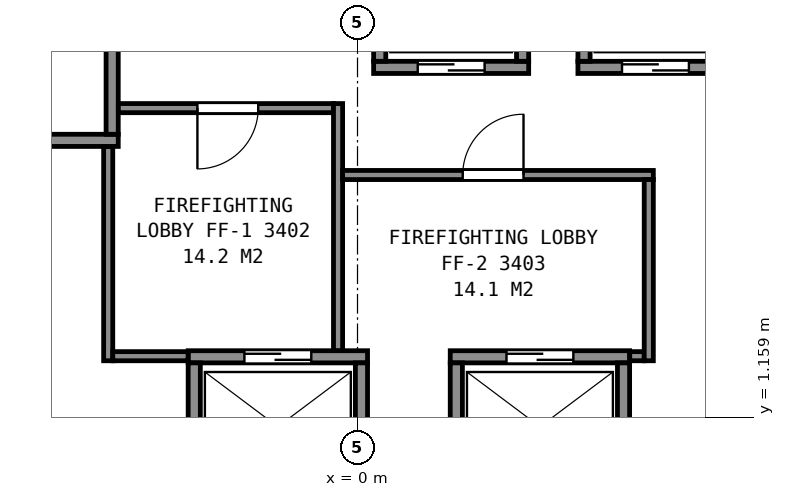
"""IFC4 building model, lengths in metres.
Left out: names, types, materials, properties, quantities, classifications, styles, units other than length and angle.
Written with IfcOpenShell. Run it as: python <this file> out.ifc"""

import sys

from ifc_helpers import new_model, si_unit, direction, frame, frame_2d, origin, place, context, subcontext, project, spatial, rectangle, extrude, element, fill, save


model = new_model("IFC4")
c1 = context("Model", 3, precision=1e-05, world=origin(), true_north=direction((0.0, 1.0)))
c2 = subcontext(c1, "Body", "Model", "MODEL_VIEW")
j1 = project(units=[si_unit("LENGTHUNIT", "METRE"), si_unit("PLANEANGLEUNIT", "RADIAN")], contexts=[c1])
p1 = place(None, origin())
s1 = spatial("IfcSite", under=j1, at=p1, CompositionType="ELEMENT")
p2 = place(p1, origin())
s2 = spatial("IfcBuilding", under=s1, at=p2, CompositionType="ELEMENT")
p3 = place(p2, frame((0.0, 0.0, 139.6)))
s3 = spatial("IfcBuildingStorey", under=s2, at=p3, CompositionType="ELEMENT", Elevation=139.6)
p4 = place(p3, frame((-2.785, 2.15, 0.0), z_axis=(0.0, 0.0, 1.0), x_axis=(1.0, 0.0, 0.0)))
e1 = element("IfcWall", 1, at=p4, inside=s3, PredefinedType="PARTITIONING", context=c2, shape_type="SweptSolid", body=[
    extrude(rectangle(XDim=2.95, YDim=0.2, at=frame_2d((1.475, 0.0))), origin(), (0.0, 0.0, 1.0), 3.6),
])
p5 = place(p4, frame((0.925, 0.0, 0.0)))
e2 = element("IfcOpeningElement", 2, at=p5, cuts=e1, PredefinedType="OPENING", context=c2, shape_type="SweptSolid", body=[
    extrude(rectangle(XDim=1.1, YDim=2.1, at=frame_2d((0.55, 1.05))), frame((0.0, 0.11, 0.0), z_axis=(0.0, -1.0, 0.0), x_axis=(1.0, 0.0, 0.0)), (0.0, 0.0, 1.0), 0.22),
])
p6 = place(p3, frame((1.525, 2.15, 0.0), z_axis=(0.0, 0.0, 1.0), x_axis=(1.0, 0.0, 0.0)))
e3 = element("IfcWall", 3, at=p6, inside=s3, PredefinedType="PARTITIONING", context=c2, shape_type="SweptSolid", body=[
    extrude(rectangle(XDim=2.95, YDim=0.2, at=frame_2d((1.475, 0.0))), origin(), (0.0, 0.0, 1.0), 3.6),
])
p7 = place(p6, frame((0.925, 0.0, 0.0)))
e4 = element("IfcOpeningElement", 4, at=p7, cuts=e3, PredefinedType="OPENING", context=c2, shape_type="SweptSolid", body=[
    extrude(rectangle(XDim=1.1, YDim=2.1, at=frame_2d((0.55, 1.05))), frame((0.0, 0.11, 0.0), z_axis=(0.0, -1.0, 0.0), x_axis=(1.0, 0.0, 0.0)), (0.0, 0.0, 1.0), 0.22),
])
p8 = place(p3, frame((-6.285, 5.71, 0.0), z_axis=(0.0, 0.0, 1.0), x_axis=(1.0, 0.0, 0.0)))
e5 = element("IfcWall", 5, at=p8, inside=s3, PredefinedType="PARTITIONING", context=c2, shape_type="SweptSolid", body=[
    extrude(rectangle(XDim=2.35, YDim=0.2, at=frame_2d((1.175, 0.0))), origin(), (0.0, 0.0, 1.0), 3.6),
])
p9 = place(p3, frame((0.265, 6.91, 0.0), z_axis=(0.0, 0.0, 1.0), x_axis=(1.0, 0.0, 0.0)))
e6 = element("IfcWall", 6, at=p9, inside=s3, PredefinedType="PARTITIONING", context=c2, shape_type="SweptSolid", body=[
    extrude(rectangle(XDim=2.55, YDim=0.2, at=frame_2d((1.275, 0.0))), origin(), (0.0, 0.0, 1.0), 3.6),
])
p10 = place(p9, frame((0.725, 0.0, 0.0)))
e7 = element("IfcOpeningElement", 7, at=p10, cuts=e6, PredefinedType="OPENING", context=c2, shape_type="SweptSolid", body=[
    extrude(rectangle(XDim=1.1, YDim=2.1, at=frame_2d((0.55, 1.05))), frame((0.0, 0.11, 0.0), z_axis=(0.0, -1.0, 0.0), x_axis=(1.0, 0.0, 0.0)), (0.0, 0.0, 1.0), 0.22),
])
p11 = place(p3, frame((3.625, 6.91, 0.0), z_axis=(0.0, 0.0, 1.0), x_axis=(1.0, 0.0, 0.0)))
e8 = element("IfcWall", 8, at=p11, inside=s3, PredefinedType="PARTITIONING", context=c2, shape_type="SweptSolid", body=[
    extrude(rectangle(XDim=2.55, YDim=0.2, at=frame_2d((1.275, 0.0))), origin(), (0.0, 0.0, 1.0), 3.6),
])
p12 = place(p11, frame((0.725, 0.0, 0.0)))
e9 = element("IfcOpeningElement", 9, at=p12, cuts=e8, PredefinedType="OPENING", context=c2, shape_type="SweptSolid", body=[
    extrude(rectangle(XDim=1.1, YDim=2.1, at=frame_2d((0.55, 1.05))), frame((0.0, 0.11, 0.0), z_axis=(0.0, -1.0, 0.0), x_axis=(1.0, 0.0, 0.0)), (0.0, 0.0, 1.0), 0.22),
])
p13 = place(p3, frame((5.663, -1.612, 0.0), z_axis=(0.0, 0.0, 1.0), x_axis=(0.49998122708, 0.866036242063, 0.0)))
e10 = element("IfcWall", 10, at=p13, inside=s3, PredefinedType="PARTITIONING", context=c2, shape_type="SweptSolid", body=[
    extrude(rectangle(XDim=4.9, YDim=0.2, at=frame_2d((2.45, 0.0))), origin(), (0.0, 0.0, 1.0), 3.6),
])
p14 = place(p3, frame((4.375, 0.1, 0.0), z_axis=(0.0, 0.0, 1.0), x_axis=(0.0, 1.0, 0.0)))
e11 = element("IfcWall", 11, at=p14, inside=s3, PredefinedType="PARTITIONING", context=c2, shape_type="SweptSolid", body=[
    extrude(rectangle(XDim=1.95, YDim=0.2, at=frame_2d((0.975, 0.0))), origin(), (0.0, 0.0, 1.0), 3.6),
])
for number, where, z_axis, x_axis in (
    (12, (3.725, 7.01, 0.0), (0.0, 0.0, 1.0), (0.0, 1.0, 0.0)),
    (13, (2.715, 7.01, 0.0), (0.0, 0.0, 1.0), (0.0, 1.0, 0.0)),
):
    element("IfcWall", number, at=place(p3, frame(where, z_axis=z_axis, x_axis=x_axis)), inside=s3, PredefinedType="PARTITIONING", context=c2, shape_type="SweptSolid", body=[
        extrude(rectangle(XDim=1.75, YDim=0.2, at=frame_2d((0.875, 0.0))), origin(), (0.0, 0.0, 1.0), 3.6),
    ])
p15 = place(p3, frame((1.625, 0.1, 0.0), z_axis=(0.0, 0.0, 1.0), x_axis=(0.0, 1.0, 0.0)))
e14 = element("IfcWall", 14, at=p15, inside=s3, PredefinedType="PARTITIONING", context=c2, shape_type="SweptSolid", body=[
    extrude(rectangle(XDim=1.95, YDim=0.2, at=frame_2d((0.975, 0.0))), origin(), (0.0, 0.0, 1.0), 3.6),
])
p16 = place(p3, frame((0.365, 7.01, 0.0), z_axis=(0.0, 0.0, 1.0), x_axis=(0.0, 1.0, 0.0)))
e15 = element("IfcWall", 15, at=p16, inside=s3, PredefinedType="PARTITIONING", context=c2, shape_type="SweptSolid", body=[
    extrude(rectangle(XDim=1.75, YDim=0.2, at=frame_2d((0.875, 0.0))), origin(), (0.0, 0.0, 1.0), 3.6),
])
for number, where, z_axis, x_axis in (
    (16, (0.065, 0.1, 0.0), (0.0, 0.0, 1.0), (0.0, 1.0, 0.0)),
    (17, (-2.685, 0.1, 0.0), (0.0, 0.0, 1.0), (0.0, 1.0, 0.0)),
):
    element("IfcWall", number, at=place(p3, frame(where, z_axis=z_axis, x_axis=x_axis)), inside=s3, PredefinedType="PARTITIONING", context=c2, shape_type="SweptSolid", body=[
        extrude(rectangle(XDim=1.95, YDim=0.2, at=frame_2d((0.975, 0.0))), origin(), (0.0, 0.0, 1.0), 3.6),
    ])
p17 = place(p3, frame((-4.035, 5.81, 0.0), z_axis=(0.0, 0.0, 1.0), x_axis=(0.0, 1.0, 0.0)))
e18 = element("IfcWall", 18, at=p17, inside=s3, PredefinedType="PARTITIONING", context=c2, shape_type="SweptSolid", body=[
    extrude(rectangle(XDim=1.75, YDim=0.2, at=frame_2d((0.875, 0.0))), origin(), (0.0, 0.0, 1.0), 3.6),
])
p18 = place(p3, frame((-13.664, 5.946, 0.0), z_axis=(0.0, 0.0, 1.0), x_axis=(0.499994327219, -0.866028678941, 0.0)))
e19 = element("IfcWall", 19, at=p18, inside=s3, PredefinedType="PARTITIONING", context=c2, shape_type="SweptSolid", body=[
    extrude(rectangle(XDim=23.968, YDim=0.2, at=frame_2d((11.984, 0.0))), origin(), (0.0, 0.0, 1.0), 3.35),
])
p19 = place(p3, frame((-4.1, 2.085, 0.0), z_axis=(0.0, 0.0, 1.0), x_axis=(0.0, 1.0, 0.0)))
e20 = element("IfcWall", 20, at=p19, inside=s3, PredefinedType="PARTITIONING", context=c2, shape_type="SweptSolid", body=[
    extrude(rectangle(XDim=3.523, YDim=0.15, at=frame_2d((1.761, 0.0))), origin(), (0.0, 0.0, 1.0), 3.35),
])
p20 = place(p3, frame((-4.025, 2.16, 0.0), z_axis=(0.0, 0.0, 1.0), x_axis=(1.0, 0.0, 0.0)))
e21 = element("IfcWall", 21, at=p20, inside=s3, PredefinedType="PARTITIONING", context=c2, shape_type="SweptSolid", body=[
    extrude(rectangle(XDim=1.238, YDim=0.15, at=frame_2d((0.619, 0.0))), origin(), (0.0, 0.0, 1.0), 3.35),
])
p21 = place(p3, frame((-3.933, 6.24, 0.0), z_axis=(0.0, 0.0, 1.0), x_axis=(1.0, 0.0, 0.0)))
e22 = element("IfcWall", 22, at=p21, inside=s3, PredefinedType="PARTITIONING", context=c2, shape_type="SweptSolid", body=[
    extrude(rectangle(XDim=3.538, YDim=0.15, at=frame_2d((1.769, 0.0))), origin(), (0.0, 0.0, 1.0), 3.35),
])
p22 = place(p21, frame((1.3, 0.0, 0.0)))
e23 = element("IfcOpeningElement", 23, at=p22, cuts=e22, PredefinedType="OPENING", context=c2, shape_type="SweptSolid", body=[
    extrude(rectangle(XDim=1.0, YDim=2.1, at=frame_2d((0.5, 1.05))), frame((0.0, 0.085, 0.0), z_axis=(0.0, -1.0, 0.0), x_axis=(1.0, 0.0, 0.0)), (0.0, 0.0, 1.0), 0.17),
])
p23 = place(p3, frame((-0.32, 2.252, 0.0), z_axis=(0.0, 0.0, 1.0), x_axis=(0.0, 1.0, 0.0)))
e24 = element("IfcWall", 24, at=p23, inside=s3, PredefinedType="PARTITIONING", context=c2, shape_type="SweptSolid", body=[
    extrude(rectangle(XDim=4.063, YDim=0.15, at=frame_2d((2.031, 0.0))), origin(), (0.0, 0.0, 1.0), 3.35),
])
p24 = place(p3, frame((-0.245, 5.14, 0.0), z_axis=(0.0, 0.0, 1.0), x_axis=(1.0, 0.0, 0.0)))
e25 = element("IfcWall", 25, at=p24, inside=s3, PredefinedType="PARTITIONING", context=c2, shape_type="SweptSolid", body=[
    extrude(rectangle(XDim=5.11, YDim=0.15, at=frame_2d((2.555, 0.0))), origin(), (0.0, 0.0, 1.0), 3.35),
])
p25 = place(p24, frame((1.975, 0.0, 0.0)))
e26 = element("IfcOpeningElement", 26, at=p25, cuts=e25, PredefinedType="OPENING", context=c2, shape_type="SweptSolid", body=[
    extrude(rectangle(XDim=1.0, YDim=2.1, at=frame_2d((0.5, 1.05))), frame((0.0, 0.085, 0.0), z_axis=(0.0, -1.0, 0.0), x_axis=(1.0, 0.0, 0.0)), (0.0, 0.0, 1.0), 0.17),
])
p26 = place(p3, frame((4.477, 2.16, 0.0), z_axis=(0.0, 0.0, 1.0), x_axis=(1.0, 0.0, 0.0)))
e27 = element("IfcWall", 27, at=p26, inside=s3, PredefinedType="PARTITIONING", context=c2, shape_type="SweptSolid", body=[
    extrude(rectangle(XDim=0.238, YDim=0.15, at=frame_2d((0.119, 0.0))), origin(), (0.0, 0.0, 1.0), 3.35),
])
p27 = place(p3, frame((4.79, 2.085, 0.0), z_axis=(0.0, 0.0, 1.0), x_axis=(0.0, 1.0, 0.0)))
e28 = element("IfcWall", 28, at=p27, inside=s3, PredefinedType="PARTITIONING", context=c2, shape_type="SweptSolid", body=[
    extrude(rectangle(XDim=2.98, YDim=0.15, at=frame_2d((1.49, 0.0))), origin(), (0.0, 0.0, 1.0), 3.35),
])
p28 = place(p3, frame((-3.756, -15.816, 0.0), z_axis=(0.0, 0.0, 1.0), x_axis=(-0.499992829944, 0.866029543379, 0.0)))
e29 = element("IfcWall", 29, at=p28, inside=s3, PredefinedType="PARTITIONING", context=c2, shape_type="SweptSolid", body=[
    extrude(rectangle(XDim=24.413, YDim=0.125, at=frame_2d((12.207, 0.0))), origin(), (0.0, 0.0, 1.0), 2.262),
])
p29 = place(p28, frame((20.478, 0.0, 0.0)))
e30 = element("IfcOpeningElement", 30, at=p29, cuts=e29, PredefinedType="OPENING", context=c2, shape_type="SweptSolid", body=[
    extrude(rectangle(XDim=1.0, YDim=2.1, at=frame_2d((0.5, 1.05))), frame((0.0, 0.073, 0.0), z_axis=(0.0, -1.0, 0.0), x_axis=(1.0, 0.0, 0.0)), (0.0, 0.0, 1.0), 0.145),
])
p30 = place(p28, frame((5.99, 0.0, 0.0)))
e31 = element("IfcOpeningElement", 31, at=p30, cuts=e29, PredefinedType="OPENING", context=c2, shape_type="SweptSolid", body=[
    extrude(rectangle(XDim=1.0, YDim=2.1, at=frame_2d((0.5, 1.05))), frame((0.0, 0.073, 0.0), z_axis=(0.0, -1.0, 0.0), x_axis=(1.0, 0.0, 0.0)), (0.0, 0.0, 1.0), 0.145),
])
p31 = place(p28, frame((1.561, 0.0, 0.0)))
e32 = element("IfcOpeningElement", 32, at=p31, cuts=e29, PredefinedType="OPENING", context=c2, shape_type="SweptSolid", body=[
    extrude(rectangle(XDim=1.0, YDim=2.1, at=frame_2d((0.5, 1.05))), frame((0.0, 0.073, 0.0), z_axis=(0.0, -1.0, 0.0), x_axis=(1.0, 0.0, 0.0)), (0.0, 0.0, 1.0), 0.145),
])
p32 = place(p3, frame((15.962, 5.326, 0.0), z_axis=(0.0, 0.0, 1.0), x_axis=(-0.499992829944, -0.866029543379, 0.0)))
e33 = element("IfcWall", 33, at=p32, inside=s3, PredefinedType="PARTITIONING", context=c2, shape_type="SweptSolid", body=[
    extrude(rectangle(XDim=24.413, YDim=0.125, at=frame_2d((12.207, 0.0))), origin(), (0.0, 0.0, 1.0), 2.262),
])
p33 = place(p32, frame((21.258, 0.0, 0.0)))
e34 = element("IfcOpeningElement", 34, at=p33, cuts=e33, PredefinedType="OPENING", context=c2, shape_type="SweptSolid", body=[
    extrude(rectangle(XDim=0.9, YDim=2.1, at=frame_2d((0.45, 1.05))), frame((0.0, 0.073, 0.0), z_axis=(0.0, -1.0, 0.0), x_axis=(1.0, 0.0, 0.0)), (0.0, 0.0, 1.0), 0.145),
])
p34 = place(p32, frame((18.502, 0.0, 0.0)))
e35 = element("IfcOpeningElement", 35, at=p34, cuts=e33, PredefinedType="OPENING", context=c2, shape_type="SweptSolid", body=[
    extrude(rectangle(XDim=0.9, YDim=2.1, at=frame_2d((0.45, 1.05))), frame((0.0, 0.073, 0.0), z_axis=(0.0, -1.0, 0.0), x_axis=(1.0, 0.0, 0.0)), (0.0, 0.0, 1.0), 0.145),
])
p35 = place(p32, frame((11.799, 0.0, 0.0)))
e36 = element("IfcOpeningElement", 36, at=p35, cuts=e33, PredefinedType="OPENING", context=c2, shape_type="SweptSolid", body=[
    extrude(rectangle(XDim=0.9, YDim=2.1, at=frame_2d((0.45, 1.05))), frame((0.0, 0.073, 0.0), z_axis=(0.0, -1.0, 0.0), x_axis=(1.0, 0.0, 0.0)), (0.0, 0.0, 1.0), 0.145),
])
p36 = place(p32, frame((9.043, 0.0, 0.0)))
e37 = element("IfcOpeningElement", 37, at=p36, cuts=e33, PredefinedType="OPENING", context=c2, shape_type="SweptSolid", body=[
    extrude(rectangle(XDim=0.9, YDim=2.1, at=frame_2d((0.45, 1.05))), frame((0.0, 0.073, 0.0), z_axis=(0.0, -1.0, 0.0), x_axis=(1.0, 0.0, 0.0)), (0.0, 0.0, 1.0), 0.145),
])
p37 = place(p32, frame((1.99, 0.0, 0.0)))
e38 = element("IfcOpeningElement", 38, at=p37, cuts=e33, PredefinedType="OPENING", context=c2, shape_type="SweptSolid", body=[
    extrude(rectangle(XDim=0.9, YDim=2.1, at=frame_2d((0.45, 1.05))), frame((0.0, 0.073, 0.0), z_axis=(0.0, -1.0, 0.0), x_axis=(1.0, 0.0, 0.0)), (0.0, 0.0, 1.0), 0.145),
])
p38 = place(p10, origin())
e39 = element("IfcDoor", 39, at=p38, inside=s3, OperationType="SLIDING_TO_LEFT", PredefinedType="DOOR", context=c2, shape_type="SweptSolid", body=[
    extrude(rectangle(XDim=1.1, YDim=2.1, at=frame_2d((0.55, 1.05))), frame((0.0, 0.025, 0.0), z_axis=(0.0, -1.0, 0.0), x_axis=(1.0, 0.0, 0.0)), (0.0, 0.0, 1.0), 0.05),
])
fill(e7, e39)
p39 = place(p12, origin())
e40 = element("IfcDoor", 40, at=p39, inside=s3, OperationType="SLIDING_TO_LEFT", PredefinedType="DOOR", context=c2, shape_type="SweptSolid", body=[
    extrude(rectangle(XDim=1.1, YDim=2.1, at=frame_2d((0.55, 1.05))), frame((0.0, 0.025, 0.0), z_axis=(0.0, -1.0, 0.0), x_axis=(1.0, 0.0, 0.0)), (0.0, 0.0, 1.0), 0.05),
])
fill(e9, e40)
p40 = place(p5, origin())
e41 = element("IfcDoor", 41, at=p40, inside=s3, OperationType="SLIDING_TO_LEFT", PredefinedType="DOOR", context=c2, shape_type="SweptSolid", body=[
    extrude(rectangle(XDim=1.1, YDim=2.1, at=frame_2d((0.55, 1.05))), frame((0.0, 0.025, 0.0), z_axis=(0.0, -1.0, 0.0), x_axis=(1.0, 0.0, 0.0)), (0.0, 0.0, 1.0), 0.05),
])
fill(e2, e41)
p41 = place(p7, origin())
e42 = element("IfcDoor", 42, at=p41, inside=s3, OperationType="SLIDING_TO_RIGHT", PredefinedType="DOOR", context=c2, shape_type="SweptSolid", body=[
    extrude(rectangle(XDim=1.1, YDim=2.1, at=frame_2d((0.55, 1.05))), frame((0.0, 0.025, 0.0), z_axis=(0.0, -1.0, 0.0), x_axis=(1.0, 0.0, 0.0)), (0.0, 0.0, 1.0), 0.05),
])
fill(e4, e42)
p42 = place(p22, origin())
e43 = element("IfcDoor", 43, at=p42, inside=s3, OperationType="SINGLE_SWING_LEFT", PredefinedType="DOOR", context=c2, shape_type="SweptSolid", body=[
    extrude(rectangle(XDim=1.0, YDim=2.1, at=frame_2d((0.5, 1.05))), frame((0.0, 0.025, 0.0), z_axis=(0.0, -1.0, 0.0), x_axis=(1.0, 0.0, 0.0)), (0.0, 0.0, 1.0), 0.05),
])
fill(e23, e43)
p43 = place(p25, origin())
e44 = element("IfcDoor", 44, at=p43, inside=s3, OperationType="SINGLE_SWING_RIGHT", PredefinedType="DOOR", context=c2, shape_type="SweptSolid", body=[
    extrude(rectangle(XDim=1.0, YDim=2.1, at=frame_2d((0.5, 1.05))), frame((0.0, 0.025, 0.0), z_axis=(0.0, -1.0, 0.0), x_axis=(1.0, 0.0, 0.0)), (0.0, 0.0, 1.0), 0.05),
])
fill(e26, e44)
save(model, sys.argv[1])
